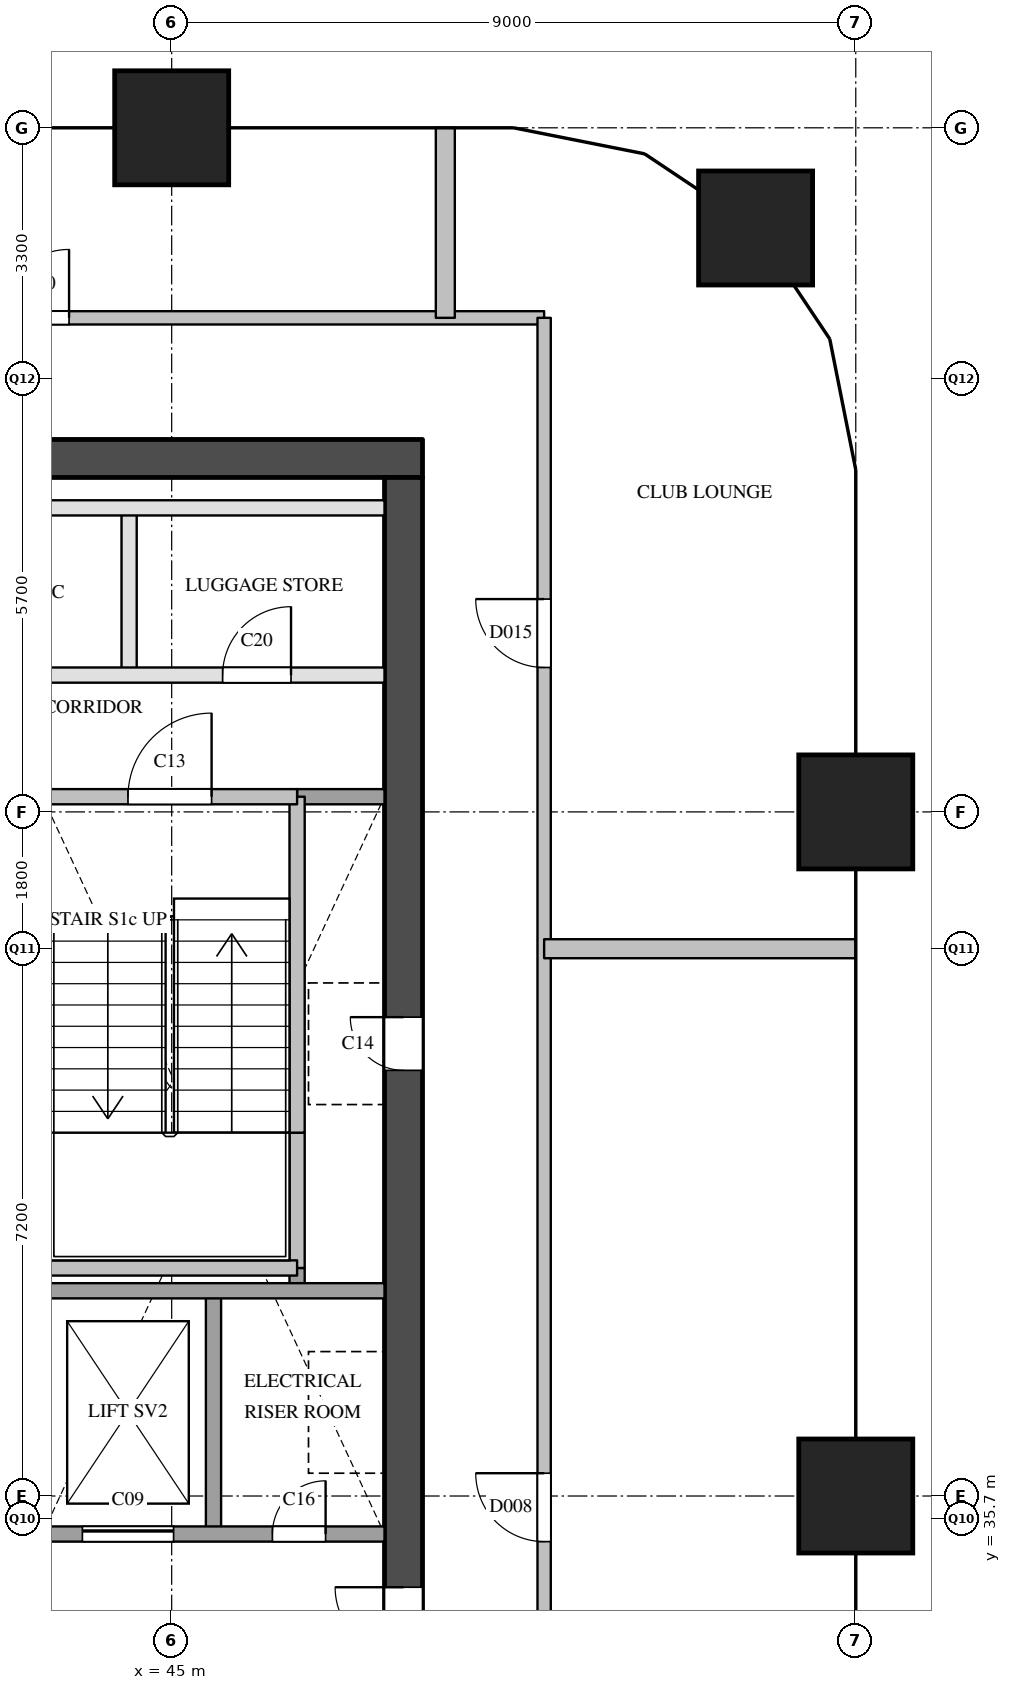
"""IFC4 building model, lengths in metres.
Left out: names, types, materials, properties, quantities, classifications, styles, units other than length and angle.
Written with IfcOpenShell. Run it as: python <this file> out.ifc"""

import sys

from ifc_helpers import new_model, si_unit, direction, frame, frame_2d, origin, origin_2d, place, context, subcontext, project, spatial, rectangle, extrude, element, fill, save


model = new_model("IFC4")
c1 = context("Model", 3, precision=1e-05, world=origin(), true_north=direction((0.0, 1.0)))
c2 = subcontext(c1, "Body", "Model", "MODEL_VIEW")
j1 = project(units=[si_unit("LENGTHUNIT", "METRE"), si_unit("PLANEANGLEUNIT", "RADIAN")], contexts=[c1])
p1 = place(None, origin())
s1 = spatial("IfcSite", under=j1, at=p1, CompositionType="ELEMENT")
p2 = place(p1, origin())
s2 = spatial("IfcBuilding", under=s1, at=p2, CompositionType="ELEMENT")
p3 = place(p2, frame((0.0, 0.0, 162.2)))
s3 = spatial("IfcBuildingStorey", under=s2, at=p3, CompositionType="ELEMENT", Elevation=162.2)
for number, where, z_axis, x_axis in (
    (1, (45.0, 54.0, 0.0), (0.0, 0.0, 1.0), (1.0, 0.0, 0.0)),
    (2, (54.0, 36.0, 0.0), (0.0, 0.0, 1.0), (1.0, 0.0, 0.0)),
    (3, (54.0, 45.0, 0.0), (0.0, 0.0, 1.0), (1.0, 0.0, 0.0)),
    (4, (52.682, 52.682, 0.0), (0.0, 0.0, 1.0), (1.0, 0.0, 0.0)),
):
    element("IfcColumn", number, at=place(p3, frame(where, z_axis=z_axis, x_axis=x_axis)), inside=s3, PredefinedType="COLUMN", context=c2, shape_type="SweptSolid", body=[
        extrude(rectangle(XDim=1.5, YDim=1.5, at=origin_2d()), origin(), (0.0, 0.0, 1.0), 3.9),
    ])
p4 = place(p3, frame((36.1, 49.65, 0.0), z_axis=(0.0, 0.0, 1.0), x_axis=(1.0, 0.0, 0.0)))
e5 = element("IfcWall", 5, at=p4, inside=s3, PredefinedType="SHEAR", context=c2, shape_type="SweptSolid", body=[
    extrude(rectangle(XDim=12.2, YDim=0.5, at=frame_2d((6.1, 0.0))), origin(), (0.0, 0.0, 1.0), 3.6),
])
p5 = place(p3, frame((48.05, 29.1, 0.0), z_axis=(0.0, 0.0, 1.0), x_axis=(0.0, 1.0, 0.0)))
e6 = element("IfcWall", 6, at=p5, inside=s3, PredefinedType="SHEAR", context=c2, shape_type="SweptSolid", body=[
    extrude(rectangle(XDim=20.3, YDim=0.5, at=frame_2d((10.15, 0.0))), origin(), (0.0, 0.0, 1.0), 3.6),
])
p6 = place(p5, frame((12.5, 0.0, 0.0)))
e7 = element("IfcOpeningElement", 7, at=p6, cuts=e6, PredefinedType="OPENING", context=c2, shape_type="SweptSolid", body=[
    extrude(rectangle(XDim=0.7, YDim=2.1, at=frame_2d((0.35, 1.05))), frame((0.0, 0.26, 0.0), z_axis=(0.0, -1.0, 0.0), x_axis=(1.0, 0.0, 0.0)), (0.0, 0.0, 1.0), 0.52),
])
p7 = place(p5, frame((3.9, 0.0, 0.0)))
e8 = element("IfcOpeningElement", 8, at=p7, cuts=e6, PredefinedType="OPENING", context=c2, shape_type="SweptSolid", body=[
    extrude(rectangle(XDim=1.8, YDim=2.1, at=frame_2d((0.9, 1.05))), frame((0.0, 0.26, 0.0), z_axis=(0.0, -1.0, 0.0), x_axis=(1.0, 0.0, 0.0)), (0.0, 0.0, 1.0), 0.52),
])
p8 = place(p3, frame((44.44, 46.8, 0.0), z_axis=(0.0, 0.0, 1.0), x_axis=(0.0, 1.0, 0.0)))
e9 = element("IfcWall", 9, at=p8, inside=s3, PredefinedType="PARTITIONING", context=c2, shape_type="SweptSolid", body=[
    extrude(rectangle(XDim=2.2, YDim=0.2, at=frame_2d((1.1, 0.0))), origin(), (0.0, 0.0, 1.0), 3.6),
])
p9 = place(p3, frame((45.55, 35.5, 0.0), z_axis=(0.0, 0.0, 1.0), x_axis=(0.0, 1.0, 0.0)))
e10 = element("IfcWall", 10, at=p9, inside=s3, PredefinedType="SOLIDWALL", context=c2, shape_type="SweptSolid", body=[
    extrude(rectangle(XDim=3.2, YDim=0.2, at=frame_2d((1.6, 0.0))), origin(), (0.0, 0.0, 1.0), 3.6),
])
p10 = place(p3, frame((46.65, 38.7, 0.0), z_axis=(0.0, 0.0, 1.0), x_axis=(0.0, 1.0, 0.0)))
e11 = element("IfcWall", 11, at=p10, inside=s3, PredefinedType="SOLIDWALL", context=c2, shape_type="SweptSolid", body=[
    extrude(rectangle(XDim=0.3, YDim=0.2, at=frame_2d((0.15, 0.0))), origin(), (0.0, 0.0, 1.0), 3.6),
])
p11 = place(p3, frame((46.65, 39.0, 0.0), z_axis=(0.0, 0.0, 1.0), x_axis=(0.0, 1.0, 0.0)))
e12 = element("IfcWall", 12, at=p11, inside=s3, PredefinedType="SOLIDWALL", context=c2, shape_type="SweptSolid", body=[
    extrude(rectangle(XDim=1.78, YDim=0.2, at=frame_2d((0.89, 0.0))), origin(), (0.0, 0.0, 1.0), 3.6),
])
p12 = place(p3, frame((46.65, 40.78, 0.0), z_axis=(0.0, 0.0, 1.0), x_axis=(0.0, 1.0, 0.0)))
e13 = element("IfcWall", 13, at=p12, inside=s3, PredefinedType="SOLIDWALL", context=c2, shape_type="SweptSolid", body=[
    extrude(rectangle(XDim=4.42, YDim=0.2, at=frame_2d((2.21, 0.0))), origin(), (0.0, 0.0, 1.0), 3.6),
])
p13 = place(p3, frame((43.3, 35.5, 0.0), z_axis=(0.0, 0.0, 1.0), x_axis=(1.0, 0.0, 0.0)))
e14 = element("IfcWall", 14, at=p13, inside=s3, PredefinedType="SOLIDWALL", context=c2, shape_type="SweptSolid", body=[
    extrude(rectangle(XDim=4.5, YDim=0.2, at=frame_2d((2.25, 0.0))), origin(), (0.0, 0.0, 1.0), 3.6),
])
p14 = place(p13, frame((0.525, 0.0, 0.0)))
e15 = element("IfcOpeningElement", 15, at=p14, cuts=e14, PredefinedType="OPENING", context=c2, shape_type="SweptSolid", body=[
    extrude(rectangle(XDim=1.2, YDim=2.1, at=frame_2d((0.6, 1.05))), frame((0.0, 0.11, 0.0), z_axis=(0.0, -1.0, 0.0), x_axis=(1.0, 0.0, 0.0)), (0.0, 0.0, 1.0), 0.22),
])
p15 = place(p13, frame((3.025, 0.0, 0.0)))
e16 = element("IfcOpeningElement", 16, at=p15, cuts=e14, PredefinedType="OPENING", context=c2, shape_type="SweptSolid", body=[
    extrude(rectangle(XDim=0.7, YDim=2.1, at=frame_2d((0.35, 1.05))), frame((0.0, 0.11, 0.0), z_axis=(0.0, -1.0, 0.0), x_axis=(1.0, 0.0, 0.0)), (0.0, 0.0, 1.0), 0.22),
])
p16 = place(p3, frame((43.3, 38.7, 0.0), z_axis=(0.0, 0.0, 1.0), x_axis=(1.0, 0.0, 0.0)))
e17 = element("IfcWall", 17, at=p16, inside=s3, PredefinedType="SOLIDWALL", context=c2, shape_type="SweptSolid", body=[
    extrude(rectangle(XDim=4.5, YDim=0.2, at=frame_2d((2.25, 0.0))), origin(), (0.0, 0.0, 1.0), 3.6),
])
p17 = place(p3, frame((43.4, 39.0, 0.0), z_axis=(0.0, 0.0, 1.0), x_axis=(1.0, 0.0, 0.0)))
e18 = element("IfcWall", 18, at=p17, inside=s3, PredefinedType="SOLIDWALL", context=c2, shape_type="SweptSolid", body=[
    extrude(rectangle(XDim=3.25, YDim=0.2, at=frame_2d((1.625, 0.0))), origin(), (0.0, 0.0, 1.0), 3.6),
])
p18 = place(p3, frame((46.65, 45.2, 0.0), z_axis=(0.0, 0.0, 1.0), x_axis=(1.0, 0.0, 0.0)))
e19 = element("IfcWall", 19, at=p18, inside=s3, PredefinedType="SOLIDWALL", context=c2, shape_type="SweptSolid", body=[
    extrude(rectangle(XDim=1.15, YDim=0.2, at=frame_2d((0.575, 0.0))), origin(), (0.0, 0.0, 1.0), 3.6),
])
p19 = place(p3, frame((36.6, 45.2, 0.0), z_axis=(0.0, 0.0, 1.0), x_axis=(1.0, 0.0, 0.0)))
e20 = element("IfcWall", 20, at=p19, inside=s3, PredefinedType="SOLIDWALL", context=c2, shape_type="SweptSolid", body=[
    extrude(rectangle(XDim=10.05, YDim=0.2, at=frame_2d((5.025, 0.0))), origin(), (0.0, 0.0, 1.0), 3.6),
])
p20 = place(p19, frame((1.125, 0.0, 0.0)))
e21 = element("IfcOpeningElement", 21, at=p20, cuts=e20, PredefinedType="OPENING", context=c2, shape_type="SweptSolid", body=[
    extrude(rectangle(XDim=1.1, YDim=2.1, at=frame_2d((0.55, 1.05))), frame((0.0, 0.11, 0.0), z_axis=(0.0, -1.0, 0.0), x_axis=(1.0, 0.0, 0.0)), (0.0, 0.0, 1.0), 0.22),
])
p21 = place(p19, frame((4.475, 0.0, 0.0)))
e22 = element("IfcOpeningElement", 22, at=p21, cuts=e20, PredefinedType="OPENING", context=c2, shape_type="SweptSolid", body=[
    extrude(rectangle(XDim=1.1, YDim=2.1, at=frame_2d((0.55, 1.05))), frame((0.0, 0.11, 0.0), z_axis=(0.0, -1.0, 0.0), x_axis=(1.0, 0.0, 0.0)), (0.0, 0.0, 1.0), 0.22),
])
p22 = place(p19, frame((7.825, 0.0, 0.0)))
e23 = element("IfcOpeningElement", 23, at=p22, cuts=e20, PredefinedType="OPENING", context=c2, shape_type="SweptSolid", body=[
    extrude(rectangle(XDim=1.1, YDim=2.1, at=frame_2d((0.55, 1.05))), frame((0.0, 0.11, 0.0), z_axis=(0.0, -1.0, 0.0), x_axis=(1.0, 0.0, 0.0)), (0.0, 0.0, 1.0), 0.22),
])
p23 = place(p3, frame((36.6, 46.8, 0.0), z_axis=(0.0, 0.0, 1.0), x_axis=(1.0, 0.0, 0.0)))
e24 = element("IfcWall", 24, at=p23, inside=s3, PredefinedType="PARTITIONING", context=c2, shape_type="SweptSolid", body=[
    extrude(rectangle(XDim=11.2, YDim=0.2, at=frame_2d((5.6, 0.0))), origin(), (0.0, 0.0, 1.0), 3.6),
])
p24 = place(p23, frame((0.67, 0.0, 0.0)))
e25 = element("IfcOpeningElement", 25, at=p24, cuts=e24, PredefinedType="OPENING", context=c2, shape_type="SweptSolid", body=[
    extrude(rectangle(XDim=0.9, YDim=2.1, at=frame_2d((0.45, 1.05))), frame((0.0, 0.11, 0.0), z_axis=(0.0, -1.0, 0.0), x_axis=(1.0, 0.0, 0.0)), (0.0, 0.0, 1.0), 0.22),
])
p25 = place(p23, frame((4.59, 0.0, 0.0)))
e26 = element("IfcOpeningElement", 26, at=p25, cuts=e24, PredefinedType="OPENING", context=c2, shape_type="SweptSolid", body=[
    extrude(rectangle(XDim=0.9, YDim=2.1, at=frame_2d((0.45, 1.05))), frame((0.0, 0.11, 0.0), z_axis=(0.0, -1.0, 0.0), x_axis=(1.0, 0.0, 0.0)), (0.0, 0.0, 1.0), 0.22),
])
p26 = place(p23, frame((9.07, 0.0, 0.0)))
e27 = element("IfcOpeningElement", 27, at=p26, cuts=e24, PredefinedType="OPENING", context=c2, shape_type="SweptSolid", body=[
    extrude(rectangle(XDim=0.9, YDim=2.1, at=frame_2d((0.45, 1.05))), frame((0.0, 0.11, 0.0), z_axis=(0.0, -1.0, 0.0), x_axis=(1.0, 0.0, 0.0)), (0.0, 0.0, 1.0), 0.22),
])
p27 = place(p3, frame((36.6, 49.0, 0.0), z_axis=(0.0, 0.0, 1.0), x_axis=(1.0, 0.0, 0.0)))
e28 = element("IfcWall", 28, at=p27, inside=s3, PredefinedType="PARTITIONING", context=c2, shape_type="SweptSolid", body=[
    extrude(rectangle(XDim=11.2, YDim=0.2, at=frame_2d((5.6, 0.0))), origin(), (0.0, 0.0, 1.0), 3.6),
])
p28 = place(p3, frame((34.5, 51.5, 0.0), z_axis=(0.0, 0.0, 1.0), x_axis=(1.0, 0.0, 0.0)))
e29 = element("IfcWall", 29, at=p28, inside=s3, PredefinedType="PARTITIONING", context=c2, shape_type="SweptSolid", body=[
    extrude(rectangle(XDim=15.4, YDim=0.175, at=frame_2d((7.7, 0.0))), origin(), (0.0, 0.0, 1.0), 3.6),
])
p29 = place(p28, frame((1.2, 0.0, 0.0)))
e30 = element("IfcOpeningElement", 30, at=p29, cuts=e29, PredefinedType="OPENING", context=c2, shape_type="SweptSolid", body=[
    extrude(rectangle(XDim=0.9, YDim=2.1, at=frame_2d((0.45, 1.05))), frame((0.0, 0.097, 0.0), z_axis=(0.0, -1.0, 0.0), x_axis=(1.0, 0.0, 0.0)), (0.0, 0.0, 1.0), 0.195),
])
p30 = place(p28, frame((8.25, 0.0, 0.0)))
e31 = element("IfcOpeningElement", 31, at=p30, cuts=e29, PredefinedType="OPENING", context=c2, shape_type="SweptSolid", body=[
    extrude(rectangle(XDim=0.9, YDim=2.1, at=frame_2d((0.45, 1.05))), frame((0.0, 0.097, 0.0), z_axis=(0.0, -1.0, 0.0), x_axis=(1.0, 0.0, 0.0)), (0.0, 0.0, 1.0), 0.195),
])
p31 = place(p3, frame((49.9, 28.5, 0.0), z_axis=(0.0, 0.0, 1.0), x_axis=(0.0, 1.0, 0.0)))
e32 = element("IfcWall", 32, at=p31, inside=s3, PredefinedType="PARTITIONING", context=c2, shape_type="SweptSolid", body=[
    extrude(rectangle(XDim=23.0, YDim=0.175, at=frame_2d((11.5, 0.0))), origin(), (0.0, 0.0, 1.0), 3.6),
])
p32 = place(p31, frame((6.9, 0.0, 0.0)))
e33 = element("IfcOpeningElement", 33, at=p32, cuts=e32, PredefinedType="OPENING", context=c2, shape_type="SweptSolid", body=[
    extrude(rectangle(XDim=0.9, YDim=2.1, at=frame_2d((0.45, 1.05))), frame((0.0, 0.097, 0.0), z_axis=(0.0, -1.0, 0.0), x_axis=(1.0, 0.0, 0.0)), (0.0, 0.0, 1.0), 0.195),
])
p33 = place(p31, frame((18.4, 0.0, 0.0)))
e34 = element("IfcOpeningElement", 34, at=p33, cuts=e32, PredefinedType="OPENING", context=c2, shape_type="SweptSolid", body=[
    extrude(rectangle(XDim=0.9, YDim=2.1, at=frame_2d((0.45, 1.05))), frame((0.0, 0.097, 0.0), z_axis=(0.0, -1.0, 0.0), x_axis=(1.0, 0.0, 0.0)), (0.0, 0.0, 1.0), 0.195),
])
p34 = place(p3, frame((49.9, 43.2, 0.0), z_axis=(0.0, 0.0, 1.0), x_axis=(1.0, 0.0, 0.0)))
e35 = element("IfcWall", 35, at=p34, inside=s3, PredefinedType="PARTITIONING", context=c2, shape_type="SweptSolid", body=[
    extrude(rectangle(XDim=4.1, YDim=0.25, at=frame_2d((2.05, 0.0))), origin(), (0.0, 0.0, 1.0), 2.6),
])
p35 = place(p3, frame((48.6, 51.5, 0.0), z_axis=(0.0, 0.0, 1.0), x_axis=(0.0, 1.0, 0.0)))
e36 = element("IfcWall", 36, at=p35, inside=s3, PredefinedType="PARTITIONING", context=c2, shape_type="SweptSolid", body=[
    extrude(rectangle(XDim=2.5, YDim=0.25, at=frame_2d((1.25, 0.0))), origin(), (0.0, 0.0, 1.0), 2.6),
])
p36 = place(p14, origin())
e37 = element("IfcDoor", 37, at=p36, inside=s3, OperationType="SLIDING_TO_LEFT", PredefinedType="DOOR", context=c2, shape_type="SweptSolid", body=[
    extrude(rectangle(XDim=1.2, YDim=2.1, at=frame_2d((0.6, 1.05))), frame((0.0, 0.025, 0.0), z_axis=(0.0, -1.0, 0.0), x_axis=(1.0, 0.0, 0.0)), (0.0, 0.0, 1.0), 0.05),
])
fill(e15, e37)
p37 = place(p22, origin())
e38 = element("IfcDoor", 38, at=p37, inside=s3, OperationType="SINGLE_SWING_RIGHT", PredefinedType="DOOR", context=c2, shape_type="SweptSolid", body=[
    extrude(rectangle(XDim=1.1, YDim=2.1, at=frame_2d((0.55, 1.05))), frame((0.0, 0.025, 0.0), z_axis=(0.0, -1.0, 0.0), x_axis=(1.0, 0.0, 0.0)), (0.0, 0.0, 1.0), 0.05),
])
fill(e23, e38)
p38 = place(p6, origin())
e39 = element("IfcDoor", 39, at=p38, inside=s3, OperationType="SINGLE_SWING_RIGHT", PredefinedType="DOOR", context=c2, shape_type="SweptSolid", body=[
    extrude(rectangle(XDim=0.7, YDim=2.1, at=frame_2d((0.35, 1.05))), frame((0.0, 0.025, 0.0), z_axis=(0.0, -1.0, 0.0), x_axis=(1.0, 0.0, 0.0)), (0.0, 0.0, 1.0), 0.05),
])
fill(e7, e39)
p39 = place(p7, origin())
e40 = element("IfcDoor", 40, at=p39, inside=s3, OperationType="DOUBLE_DOOR_SINGLE_SWING", PredefinedType="DOOR", context=c2, shape_type="SweptSolid", body=[
    extrude(rectangle(XDim=1.8, YDim=2.1, at=frame_2d((0.9, 1.05))), frame((0.0, 0.025, 0.0), z_axis=(0.0, -1.0, 0.0), x_axis=(1.0, 0.0, 0.0)), (0.0, 0.0, 1.0), 0.05),
])
fill(e8, e40)
p40 = place(p15, origin())
e41 = element("IfcDoor", 41, at=p40, inside=s3, OperationType="SINGLE_SWING_RIGHT", PredefinedType="DOOR", context=c2, shape_type="SweptSolid", body=[
    extrude(rectangle(XDim=0.7, YDim=2.1, at=frame_2d((0.35, 1.05))), frame((0.0, 0.025, 0.0), z_axis=(0.0, -1.0, 0.0), x_axis=(1.0, 0.0, 0.0)), (0.0, 0.0, 1.0), 0.05),
])
fill(e16, e41)
p41 = place(p26, origin())
e42 = element("IfcDoor", 42, at=p41, inside=s3, OperationType="SINGLE_SWING_RIGHT", PredefinedType="DOOR", context=c2, shape_type="SweptSolid", body=[
    extrude(rectangle(XDim=0.9, YDim=2.1, at=frame_2d((0.45, 1.05))), frame((0.0, 0.025, 0.0), z_axis=(0.0, -1.0, 0.0), x_axis=(1.0, 0.0, 0.0)), (0.0, 0.0, 1.0), 0.05),
])
fill(e27, e42)
p42 = place(p32, origin())
e43 = element("IfcDoor", 43, at=p42, inside=s3, OperationType="SINGLE_SWING_RIGHT", PredefinedType="DOOR", context=c2, shape_type="SweptSolid", body=[
    extrude(rectangle(XDim=0.9, YDim=2.1, at=frame_2d((0.45, 1.05))), frame((0.0, 0.025, 0.0), z_axis=(0.0, -1.0, 0.0), x_axis=(1.0, 0.0, 0.0)), (0.0, 0.0, 1.0), 0.05),
])
fill(e33, e43)
p43 = place(p33, origin())
e44 = element("IfcDoor", 44, at=p43, inside=s3, OperationType="SINGLE_SWING_RIGHT", PredefinedType="DOOR", context=c2, shape_type="SweptSolid", body=[
    extrude(rectangle(XDim=0.9, YDim=2.1, at=frame_2d((0.45, 1.05))), frame((0.0, 0.025, 0.0), z_axis=(0.0, -1.0, 0.0), x_axis=(1.0, 0.0, 0.0)), (0.0, 0.0, 1.0), 0.05),
])
fill(e34, e44)
p44 = place(p30, origin())
e45 = element("IfcDoor", 45, at=p44, inside=s3, OperationType="SINGLE_SWING_RIGHT", PredefinedType="DOOR", context=c2, shape_type="SweptSolid", body=[
    extrude(rectangle(XDim=0.9, YDim=2.1, at=frame_2d((0.45, 1.05))), frame((0.0, 0.025, 0.0), z_axis=(0.0, -1.0, 0.0), x_axis=(1.0, 0.0, 0.0)), (0.0, 0.0, 1.0), 0.05),
])
fill(e31, e45)
save(model, sys.argv[1])
